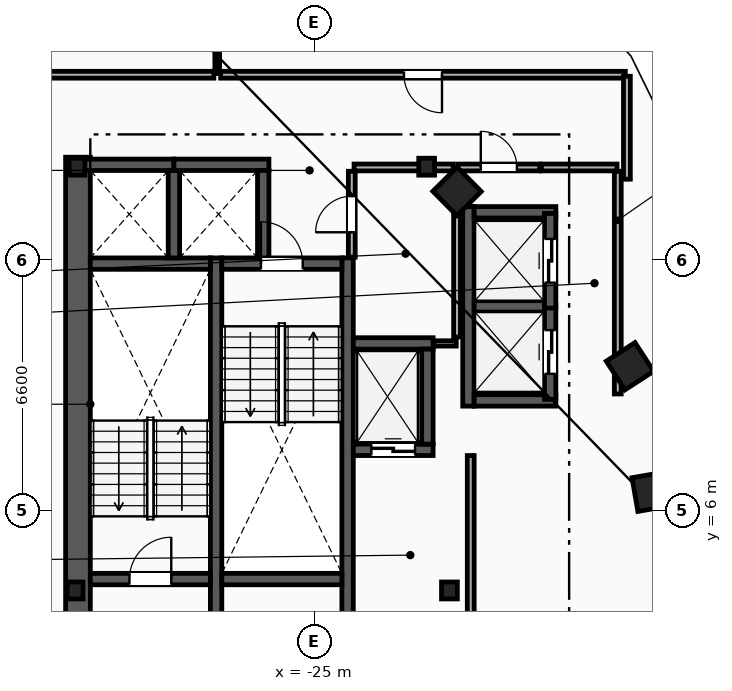
"""IFC4 building model, lengths in metres.
Left out: names, types, materials, properties, quantities, classifications, styles, units other than length and angle.
Written with IfcOpenShell. Run it as: python <this file> out.ifc"""

import sys

from ifc_helpers import new_model, si_unit, direction, frame, frame_2d, origin, origin_2d, place, context, subcontext, project, spatial, rectangle, i_section, extrude, element, fill, save


model = new_model("IFC4")
c1 = context("Model", 3, precision=1e-05, world=origin(), true_north=direction((0.0, 1.0)))
c2 = subcontext(c1, "Body", "Model", "MODEL_VIEW")
j1 = project(units=[si_unit("LENGTHUNIT", "METRE"), si_unit("PLANEANGLEUNIT", "RADIAN")], contexts=[c1])
p1 = place(None, origin())
s1 = spatial("IfcSite", under=j1, at=p1, CompositionType="ELEMENT")
p2 = place(p1, origin())
s2 = spatial("IfcBuilding", under=s1, at=p2, CompositionType="ELEMENT")
p3 = place(p2, frame((0.0, 0.0, 209.8)))
s3 = spatial("IfcBuildingStorey", under=s2, at=p3, CompositionType="ELEMENT", Elevation=209.8)
for number, where, z_axis, x_axis in (
    (1, (-31.3, 3.9, 0.0), (0.0, 0.0, 1.0), (1.0, 0.0, 0.0)),
    (2, (-21.45, 3.9, 0.0), (0.0, 0.0, 1.0), (1.0, 0.0, 0.0)),
    (3, (-22.05, 15.05, 0.0), (0.0, 0.0, 1.0), (1.0, 0.0, 0.0)),
    (4, (-31.25, 15.05, 0.0), (0.0, 0.0, 1.0), (1.0, 0.0, 0.0)),
):
    element("IfcColumn", number, at=place(p3, frame(where, z_axis=z_axis, x_axis=x_axis)), inside=s3, PredefinedType="COLUMN", context=c2, shape_type="SweptSolid", body=[
        extrude(i_section(OverallWidth=0.416, OverallDepth=0.446, WebThickness=0.039, FlangeThickness=0.063, FilletRadius=0.018, at=origin_2d()), origin(), (0.0, 0.0, 1.0), 3.6),
    ])
for number, where, z_axis, x_axis in (
    (5, (-15.55, 3.2, 0.0), (0.0, 0.0, 1.0), (0.315, 0.949, 0.0)),
    (6, (-16.125, 6.5, 0.0), (0.0, 0.0, 1.0), (-0.172, 0.985, 0.0)),
    (7, (-16.7, 9.8, 0.0), (0.0, 0.0, 1.0), (-0.544, 0.839, 0.0)),
    (8, (-21.25, 14.4, 0.0), (0.0, 0.0, 1.0), (-0.703, 0.711, 0.0)),
):
    element("IfcColumn", number, at=place(p3, frame(where, z_axis=z_axis, x_axis=x_axis)), inside=s3, PredefinedType="COLUMN", context=c2, shape_type="SweptSolid", body=[
        extrude(rectangle(XDim=0.9, YDim=0.9, at=origin_2d()), origin(), (0.0, 0.0, 1.0), 3.6),
    ])
p4 = place(p3, frame((-31.225, 1.97, 0.0), z_axis=(0.0, 0.0, 1.0), x_axis=(0.0, 1.0, 0.0)))
e9 = element("IfcWall", 9, at=p4, inside=s3, PredefinedType="SHEAR", context=c2, shape_type="SweptSolid", body=[
    extrude(rectangle(XDim=13.33, YDim=0.65, at=frame_2d((6.665, 0.0))), origin(), (0.0, 0.0, 1.0), 3.34),
])
for number, where, z_axis, x_axis in (
    (10, (-27.59, 1.97, 0.0), (0.0, 0.0, 1.0), (0.0, 1.0, 0.0)),
    (11, (-24.13, 1.97, 0.0), (0.0, 0.0, 1.0), (0.0, 1.0, 0.0)),
):
    element("IfcWall", number, at=place(p3, frame(where, z_axis=z_axis, x_axis=x_axis)), inside=s3, PredefinedType="SHEAR", context=c2, shape_type="SweptSolid", body=[
        extrude(rectangle(XDim=10.68, YDim=0.3, at=frame_2d((5.34, 0.0))), origin(), (0.0, 0.0, 1.0), 3.34),
    ])
p5 = place(p3, frame((-30.9, 4.2, 0.0), z_axis=(0.0, 0.0, 1.0), x_axis=(1.0, 0.0, 0.0)))
e12 = element("IfcWall", 12, at=p5, inside=s3, PredefinedType="SHEAR", context=c2, shape_type="SweptSolid", body=[
    extrude(rectangle(XDim=3.16, YDim=0.3, at=frame_2d((1.58, 0.0))), origin(), (0.0, 0.0, 1.0), 3.34),
])
p6 = place(p5, frame((1.03, 0.0, 0.0)))
e13 = element("IfcOpeningElement", 13, at=p6, cuts=e12, PredefinedType="OPENING", context=c2, shape_type="SweptSolid", body=[
    extrude(rectangle(XDim=1.1, YDim=2.15, at=frame_2d((0.55, 1.075))), frame((0.0, 0.16, 0.0), z_axis=(0.0, -1.0, 0.0), x_axis=(1.0, 0.0, 0.0)), (0.0, 0.0, 1.0), 0.32),
])
p7 = place(p3, frame((-30.9, 12.5, 0.0), z_axis=(0.0, 0.0, 1.0), x_axis=(1.0, 0.0, 0.0)))
e14 = element("IfcWall", 14, at=p7, inside=s3, PredefinedType="SHEAR", context=c2, shape_type="SweptSolid", body=[
    extrude(rectangle(XDim=3.16, YDim=0.3, at=frame_2d((1.58, 0.0))), origin(), (0.0, 0.0, 1.0), 3.34),
])
p8 = place(p3, frame((-27.44, 12.5, 0.0), z_axis=(0.0, 0.0, 1.0), x_axis=(1.0, 0.0, 0.0)))
e15 = element("IfcWall", 15, at=p8, inside=s3, PredefinedType="SHEAR", context=c2, shape_type="SweptSolid", body=[
    extrude(rectangle(XDim=3.16, YDim=0.3, at=frame_2d((1.58, 0.0))), origin(), (0.0, 0.0, 1.0), 3.34),
])
p9 = place(p8, frame((1.03, 0.0, 0.0)))
e16 = element("IfcOpeningElement", 16, at=p9, cuts=e15, PredefinedType="OPENING", context=c2, shape_type="SweptSolid", body=[
    extrude(rectangle(XDim=1.1, YDim=2.15, at=frame_2d((0.55, 1.075))), frame((0.0, 0.16, 0.0), z_axis=(0.0, -1.0, 0.0), x_axis=(1.0, 0.0, 0.0)), (0.0, 0.0, 1.0), 0.32),
])
p10 = place(p3, frame((-27.44, 4.2, 0.0), z_axis=(0.0, 0.0, 1.0), x_axis=(1.0, 0.0, 0.0)))
e17 = element("IfcWall", 17, at=p10, inside=s3, PredefinedType="SHEAR", context=c2, shape_type="SweptSolid", body=[
    extrude(rectangle(XDim=3.16, YDim=0.3, at=frame_2d((1.58, 0.0))), origin(), (0.0, 0.0, 1.0), 3.34),
])
p11 = place(p3, frame((-20.89, 2.15, 0.0), z_axis=(0.0, 0.0, 1.0), x_axis=(0.0, 1.0, 0.0)))
e18 = element("IfcWall", 18, at=p11, inside=s3, PredefinedType="PARTITIONING", context=c2, shape_type="SweptSolid", body=[
    extrude(rectangle(XDim=5.3, YDim=0.18, at=frame_2d((2.65, 0.0))), origin(), (0.0, 0.0, 1.0), 3.34),
])
p12 = place(p3, frame((-23.98, 7.6, 0.0), z_axis=(0.0, 0.0, 1.0), x_axis=(1.0, 0.0, 0.0)))
e19 = element("IfcWall", 19, at=p12, inside=s3, PredefinedType="SHEAR", context=c2, shape_type="SweptSolid", body=[
    extrude(rectangle(XDim=2.1, YDim=0.3, at=frame_2d((1.05, 0.0))), origin(), (0.0, 0.0, 1.0), 3.34),
])
p13 = place(p12, frame((0.475, 0.0, 0.0)))
e20 = element("IfcOpeningElement", 20, at=p13, cuts=e19, PredefinedType="OPENING", context=c2, shape_type="SweptSolid", body=[
    extrude(rectangle(XDim=1.15, YDim=2.2, at=frame_2d((0.575, 1.1))), frame((0.0, 0.16, 0.0), z_axis=(0.0, -1.0, 0.0), x_axis=(1.0, 0.0, 0.0)), (0.0, 0.0, 1.0), 0.32),
])
p14 = place(p3, frame((-23.98, 10.4, 0.0), z_axis=(0.0, 0.0, 1.0), x_axis=(1.0, 0.0, 0.0)))
e21 = element("IfcWall", 21, at=p14, inside=s3, PredefinedType="SHEAR", context=c2, shape_type="SweptSolid", body=[
    extrude(rectangle(XDim=2.1, YDim=0.3, at=frame_2d((1.05, 0.0))), origin(), (0.0, 0.0, 1.0), 3.34),
])
for number, where, z_axis, x_axis in (
    (22, (-22.03, 7.75, 0.0), (0.0, 0.0, 1.0), (0.0, 1.0, 0.0)),
    (23, (-31.2, 15.1, 0.0), (0.0, 0.0, 1.0), (1.0, 0.0, 0.0)),
):
    element("IfcWall", number, at=place(p3, frame(where, z_axis=z_axis, x_axis=x_axis)), inside=s3, PredefinedType="SHEAR", context=c2, shape_type="SweptSolid", body=[
        extrude(rectangle(XDim=2.5, YDim=0.3, at=frame_2d((1.25, 0.0))), origin(), (0.0, 0.0, 1.0), 3.34),
    ])
p15 = place(p3, frame((-28.7, 12.65, 0.0), z_axis=(0.0, 0.0, 1.0), x_axis=(0.0, 1.0, 0.0)))
e24 = element("IfcWall", 24, at=p15, inside=s3, PredefinedType="SHEAR", context=c2, shape_type="SweptSolid", body=[
    extrude(rectangle(XDim=2.3, YDim=0.3, at=frame_2d((1.15, 0.0))), origin(), (0.0, 0.0, 1.0), 3.34),
])
p16 = place(p3, frame((-28.7, 15.1, 0.0), z_axis=(0.0, 0.0, 1.0), x_axis=(1.0, 0.0, 0.0)))
e25 = element("IfcWall", 25, at=p16, inside=s3, PredefinedType="SHEAR", context=c2, shape_type="SweptSolid", body=[
    extrude(rectangle(XDim=2.5, YDim=0.3, at=frame_2d((1.25, 0.0))), origin(), (0.0, 0.0, 1.0), 3.34),
])
p17 = place(p3, frame((-26.35, 12.65, 0.0), z_axis=(0.0, 0.0, 1.0), x_axis=(0.0, 1.0, 0.0)))
e26 = element("IfcWall", 26, at=p17, inside=s3, PredefinedType="SHEAR", context=c2, shape_type="SweptSolid", body=[
    extrude(rectangle(XDim=2.3, YDim=0.3, at=frame_2d((1.15, 0.0))), origin(), (0.0, 0.0, 1.0), 3.34),
])
p18 = place(p3, frame((-20.95, 8.75, 0.0), z_axis=(0.0, 0.0, 1.0), x_axis=(0.0, 1.0, 0.0)))
e27 = element("IfcWall", 27, at=p18, inside=s3, PredefinedType="SHEAR", context=c2, shape_type="SweptSolid", body=[
    extrude(rectangle(XDim=5.25, YDim=0.3, at=frame_2d((2.625, 0.0))), origin(), (0.0, 0.0, 1.0), 3.34),
])
for number, where, z_axis, x_axis in (
    (28, (-20.8, 8.9, 0.0), (0.0, 0.0, 1.0), (1.0, 0.0, 0.0)),
    (29, (-20.8, 13.85, 0.0), (0.0, 0.0, 1.0), (1.0, 0.0, 0.0)),
):
    element("IfcWall", number, at=place(p3, frame(where, z_axis=z_axis, x_axis=x_axis)), inside=s3, PredefinedType="SHEAR", context=c2, shape_type="SweptSolid", body=[
        extrude(rectangle(XDim=2.15, YDim=0.3, at=frame_2d((1.075, 0.0))), origin(), (0.0, 0.0, 1.0), 3.34),
    ])
p19 = place(p3, frame((-20.8, 11.375, 0.0), z_axis=(0.0, 0.0, 1.0), x_axis=(1.0, 0.0, 0.0)))
e30 = element("IfcWall", 30, at=p19, inside=s3, PredefinedType="SHEAR", context=c2, shape_type="SweptSolid", body=[
    extrude(rectangle(XDim=1.85, YDim=0.3, at=frame_2d((0.925, 0.0))), origin(), (0.0, 0.0, 1.0), 3.34),
])
p20 = place(p3, frame((-18.8, 8.93, 0.0), z_axis=(0.0, 0.0, 1.0), x_axis=(0.0, 1.0, 0.0)))
e31 = element("IfcWall", 31, at=p20, inside=s3, PredefinedType="SHEAR", context=c2, shape_type="SweptSolid", body=[
    extrude(rectangle(XDim=2.49, YDim=0.3, at=frame_2d((1.245, 0.0))), origin(), (0.0, 0.0, 1.0), 3.34),
])
p21 = place(p20, frame((0.67, 0.0, 0.0)))
e32 = element("IfcOpeningElement", 32, at=p21, cuts=e31, PredefinedType="OPENING", context=c2, shape_type="SweptSolid", body=[
    extrude(rectangle(XDim=1.15, YDim=2.2, at=frame_2d((0.575, 1.1))), frame((0.0, 0.16, 0.0), z_axis=(0.0, -1.0, 0.0), x_axis=(1.0, 0.0, 0.0)), (0.0, 0.0, 1.0), 0.32),
])
p22 = place(p3, frame((-18.8, 11.33, 0.0), z_axis=(0.0, 0.0, 1.0), x_axis=(0.0, 1.0, 0.0)))
e33 = element("IfcWall", 33, at=p22, inside=s3, PredefinedType="SHEAR", context=c2, shape_type="SweptSolid", body=[
    extrude(rectangle(XDim=2.49, YDim=0.3, at=frame_2d((1.245, 0.0))), origin(), (0.0, 0.0, 1.0), 3.34),
])
p23 = place(p22, frame((0.67, 0.0, 0.0)))
e34 = element("IfcOpeningElement", 34, at=p23, cuts=e33, PredefinedType="OPENING", context=c2, shape_type="SweptSolid", body=[
    extrude(rectangle(XDim=1.15, YDim=2.2, at=frame_2d((0.575, 1.1))), frame((0.0, 0.16, 0.0), z_axis=(0.0, -1.0, 0.0), x_axis=(1.0, 0.0, 0.0)), (0.0, 0.0, 1.0), 0.32),
])
p24 = place(p3, frame((-17.02, 9.07, 0.0), z_axis=(0.0, 0.0, 1.0), x_axis=(0.0, 1.0, 0.0)))
e35 = element("IfcWall", 35, at=p24, inside=s3, PredefinedType="PARTITIONING", context=c2, shape_type="SweptSolid", body=[
    extrude(rectangle(XDim=5.86, YDim=0.18, at=frame_2d((2.93, 0.0))), origin(), (0.0, 0.0, 1.0), 3.34),
])
p25 = place(p3, frame((-21.23, 15.03, 0.0), z_axis=(0.0, 0.0, 1.0), x_axis=(1.0, 0.0, 0.0)))
e36 = element("IfcWall", 36, at=p25, inside=s3, PredefinedType="PARTITIONING", context=c2, shape_type="SweptSolid", body=[
    extrude(rectangle(XDim=2.16, YDim=0.18, at=frame_2d((1.08, 0.0))), origin(), (0.0, 0.0, 1.0), 3.34),
])
p26 = place(p25, frame((0.605, 0.0, 0.0)))
e37 = element("IfcOpeningElement", 37, at=p26, cuts=e36, PredefinedType="OPENING", context=c2, shape_type="SweptSolid", body=[
    extrude(rectangle(XDim=0.95, YDim=2.1, at=frame_2d((0.475, 1.05))), frame((0.0, 0.1, 0.0), z_axis=(0.0, -1.0, 0.0), x_axis=(1.0, 0.0, 0.0)), (0.0, 0.0, 1.0), 0.2),
])
p27 = place(p3, frame((-19.03, 15.03, 0.0), z_axis=(0.0, 0.0, 1.0), x_axis=(1.0, 0.0, 0.0)))
e38 = element("IfcWall", 38, at=p27, inside=s3, PredefinedType="PARTITIONING", context=c2, shape_type="SweptSolid", body=[
    extrude(rectangle(XDim=1.99, YDim=0.18, at=frame_2d((0.995, 0.0))), origin(), (0.0, 0.0, 1.0), 3.34),
])
p28 = place(p3, frame((-21.86, 10.4, 0.0), z_axis=(0.0, 0.0, 1.0), x_axis=(1.0, 0.0, 0.0)))
e39 = element("IfcWall", 39, at=p28, inside=s3, PredefinedType="PARTITIONING", context=c2, shape_type="SweptSolid", body=[
    extrude(rectangle(XDim=0.59, YDim=0.14, at=frame_2d((0.295, 0.0))), origin(), (0.0, 0.0, 1.0), 3.34),
])
p29 = place(p3, frame((-21.25, 10.57, 0.0), z_axis=(0.0, 0.0, 1.0), x_axis=(0.0, 1.0, 0.0)))
e40 = element("IfcWall", 40, at=p29, inside=s3, PredefinedType="PARTITIONING", context=c2, shape_type="SweptSolid", body=[
    extrude(rectangle(XDim=4.36, YDim=0.18, at=frame_2d((2.18, 0.0))), origin(), (0.0, 0.0, 1.0), 3.34),
])
p30 = place(p3, frame((-23.96, 15.03, 0.0), z_axis=(0.0, 0.0, 1.0), x_axis=(1.0, 0.0, 0.0)))
e41 = element("IfcWall", 41, at=p30, inside=s3, PredefinedType="PARTITIONING", context=c2, shape_type="SweptSolid", body=[
    extrude(rectangle(XDim=2.61, YDim=0.18, at=frame_2d((1.305, 0.0))), origin(), (0.0, 0.0, 1.0), 2.413),
])
p31 = place(p3, frame((-24.02, 12.67, 0.0), z_axis=(0.0, 0.0, 1.0), x_axis=(0.0, 1.0, 0.0)))
e42 = element("IfcWall", 42, at=p31, inside=s3, PredefinedType="PARTITIONING", context=c2, shape_type="SweptSolid", body=[
    extrude(rectangle(XDim=2.26, YDim=0.18, at=frame_2d((1.13, 0.0))), origin(), (0.0, 0.0, 1.0), 3.34),
])
p32 = place(p31, frame((0.655, 0.0, 0.0)))
e43 = element("IfcOpeningElement", 43, at=p32, cuts=e42, PredefinedType="OPENING", context=c2, shape_type="SweptSolid", body=[
    extrude(rectangle(XDim=0.95, YDim=2.1, at=frame_2d((0.475, 1.05))), frame((0.0, 0.1, 0.0), z_axis=(0.0, -1.0, 0.0), x_axis=(1.0, 0.0, 0.0)), (0.0, 0.0, 1.0), 0.2),
])
p33 = place(p3, frame((-27.56, 17.5, 0.0), z_axis=(0.0, 0.0, 1.0), x_axis=(0.0, 1.0, 0.0)))
e44 = element("IfcWall", 44, at=p33, inside=s3, PredefinedType="PARTITIONING", context=c2, shape_type="SweptSolid", body=[
    extrude(rectangle(XDim=7.233, YDim=0.125, at=frame_2d((3.617, 0.0))), origin(), (0.0, 0.0, 1.0), 3.34),
])
p34 = place(p3, frame((-16.822, 17.47, 0.0), z_axis=(0.0, 0.0, 1.0), x_axis=(-1.0, 0.0, 0.0)))
e45 = element("IfcWall", 45, at=p34, inside=s3, PredefinedType="PARTITIONING", context=c2, shape_type="SweptSolid", body=[
    extrude(rectangle(XDim=10.648, YDim=0.18, at=frame_2d((5.324, 0.0))), origin(), (0.0, 0.0, 1.0), 3.34),
])
p35 = place(p34, frame((4.824, 0.0, 0.0)))
e46 = element("IfcOpeningElement", 46, at=p35, cuts=e45, PredefinedType="OPENING", context=c2, shape_type="SweptSolid", body=[
    extrude(rectangle(XDim=1.0, YDim=2.15, at=frame_2d((0.5, 1.075))), frame((0.0, 0.1, 0.0), z_axis=(0.0, -1.0, 0.0), x_axis=(1.0, 0.0, 0.0)), (0.0, 0.0, 1.0), 0.2),
])
p36 = place(p3, frame((-16.78, 14.721, 0.0), z_axis=(0.0, 0.0, 1.0), x_axis=(0.0, 1.0, 0.0)))
e47 = element("IfcWall", 47, at=p36, inside=s3, PredefinedType="PARTITIONING", context=c2, shape_type="SweptSolid", body=[
    extrude(rectangle(XDim=2.707, YDim=0.18, at=frame_2d((1.354, 0.0))), origin(), (0.0, 0.0, 1.0), 3.34),
])
p37 = place(p3, frame((-27.65, 17.47, 0.0), z_axis=(0.0, 0.0, 1.0), x_axis=(-1.0, 0.0, 0.0)))
e48 = element("IfcWall", 48, at=p37, inside=s3, PredefinedType="PARTITIONING", context=c2, shape_type="SweptSolid", body=[
    extrude(rectangle(XDim=5.979, YDim=0.18, at=frame_2d((2.989, 0.0))), origin(), (0.0, 0.0, 1.0), 3.34),
])
p38 = place(p6, origin())
e49 = element("IfcDoor", 49, at=p38, inside=s3, OperationType="SINGLE_SWING_RIGHT", PredefinedType="DOOR", context=c2, shape_type="SweptSolid", body=[
    extrude(rectangle(XDim=1.1, YDim=2.15, at=frame_2d((0.55, 1.075))), frame((0.0, 0.025, 0.0), z_axis=(0.0, -1.0, 0.0), x_axis=(1.0, 0.0, 0.0)), (0.0, 0.0, 1.0), 0.05),
])
fill(e13, e49)
p39 = place(p9, origin())
e50 = element("IfcDoor", 50, at=p39, inside=s3, OperationType="SINGLE_SWING_LEFT", PredefinedType="DOOR", context=c2, shape_type="SweptSolid", body=[
    extrude(rectangle(XDim=1.1, YDim=2.15, at=frame_2d((0.55, 1.075))), frame((0.0, 0.025, 0.0), z_axis=(0.0, -1.0, 0.0), x_axis=(1.0, 0.0, 0.0)), (0.0, 0.0, 1.0), 0.05),
])
fill(e16, e50)
p40 = place(p13, origin())
e51 = element("IfcDoor", 51, at=p40, inside=s3, OperationType="SLIDING_TO_LEFT", PredefinedType="TRAPDOOR", context=c2, shape_type="SweptSolid", body=[
    extrude(rectangle(XDim=1.15, YDim=2.2, at=frame_2d((0.575, 1.1))), frame((0.0, 0.025, 0.0), z_axis=(0.0, -1.0, 0.0), x_axis=(1.0, 0.0, 0.0)), (0.0, 0.0, 1.0), 0.05),
])
fill(e20, e51)
p41 = place(p21, origin())
e52 = element("IfcDoor", 52, at=p41, inside=s3, OperationType="SLIDING_TO_LEFT", PredefinedType="TRAPDOOR", context=c2, shape_type="SweptSolid", body=[
    extrude(rectangle(XDim=1.15, YDim=2.2, at=frame_2d((0.575, 1.1))), frame((0.0, 0.025, 0.0), z_axis=(0.0, -1.0, 0.0), x_axis=(1.0, 0.0, 0.0)), (0.0, 0.0, 1.0), 0.05),
])
fill(e32, e52)
p42 = place(p23, origin())
e53 = element("IfcDoor", 53, at=p42, inside=s3, OperationType="SLIDING_TO_LEFT", PredefinedType="TRAPDOOR", context=c2, shape_type="SweptSolid", body=[
    extrude(rectangle(XDim=1.15, YDim=2.2, at=frame_2d((0.575, 1.1))), frame((0.0, 0.025, 0.0), z_axis=(0.0, -1.0, 0.0), x_axis=(1.0, 0.0, 0.0)), (0.0, 0.0, 1.0), 0.05),
])
fill(e34, e53)
p43 = place(p35, origin())
e54 = element("IfcDoor", 54, at=p43, inside=s3, OperationType="SINGLE_SWING_LEFT", PredefinedType="DOOR", context=c2, shape_type="SweptSolid", body=[
    extrude(rectangle(XDim=1.0, YDim=2.15, at=frame_2d((0.5, 1.075))), frame((0.0, 0.025, 0.0), z_axis=(0.0, -1.0, 0.0), x_axis=(1.0, 0.0, 0.0)), (0.0, 0.0, 1.0), 0.05),
])
fill(e46, e54)
p44 = place(p32, origin())
e55 = element("IfcDoor", 55, at=p44, inside=s3, OperationType="SINGLE_SWING_LEFT", PredefinedType="DOOR", context=c2, shape_type="SweptSolid", body=[
    extrude(rectangle(XDim=0.95, YDim=2.1, at=frame_2d((0.475, 1.05))), frame((0.0, 0.025, 0.0), z_axis=(0.0, -1.0, 0.0), x_axis=(1.0, 0.0, 0.0)), (0.0, 0.0, 1.0), 0.05),
])
fill(e43, e55)
p45 = place(p26, origin())
e56 = element("IfcDoor", 56, at=p45, inside=s3, OperationType="SINGLE_SWING_LEFT", PredefinedType="DOOR", context=c2, shape_type="SweptSolid", body=[
    extrude(rectangle(XDim=0.95, YDim=2.1, at=frame_2d((0.475, 1.05))), frame((0.0, 0.025, 0.0), z_axis=(0.0, -1.0, 0.0), x_axis=(1.0, 0.0, 0.0)), (0.0, 0.0, 1.0), 0.05),
])
fill(e37, e56)
save(model, sys.argv[1])
